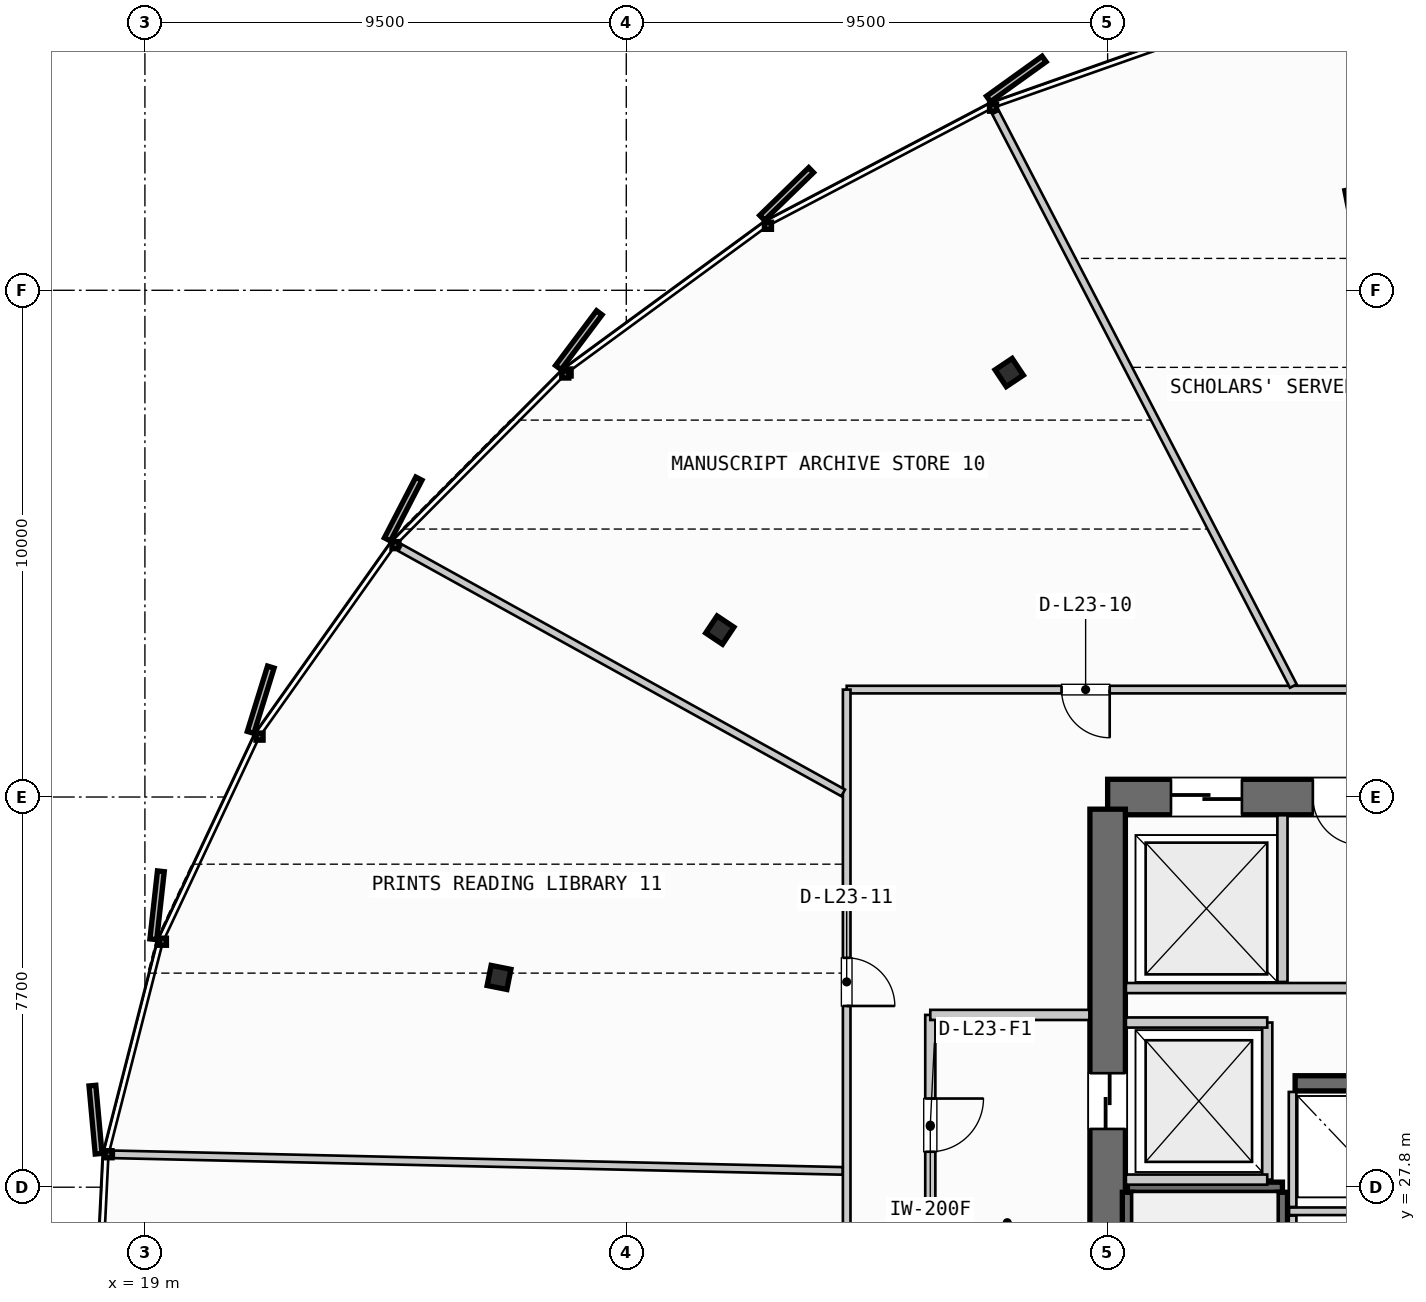
"""IFC4 building model, lengths in metres.
Left out: names, types, materials, properties, quantities, classifications, styles, units other than length and angle.
Written with IfcOpenShell. Run it as: python <this file> out.ifc"""

import sys

from ifc_helpers import new_model, si_unit, direction, frame, frame_2d, origin, origin_2d, place, context, subcontext, project, spatial, rectangle, i_section, extrude, source, transform, mapped, element, fill, save


model = new_model("IFC4")
c1 = context("Model", 3, precision=1e-05, world=origin(), true_north=direction((0.0, 1.0)))
c2 = subcontext(c1, "Body", "Model", "MODEL_VIEW")
j1 = project(units=[si_unit("LENGTHUNIT", "METRE"), si_unit("PLANEANGLEUNIT", "RADIAN")], contexts=[c1])
p1 = place(None, origin())
s1 = spatial("IfcSite", under=j1, at=p1, CompositionType="ELEMENT")
p2 = place(p1, origin())
s2 = spatial("IfcBuilding", under=s1, at=p2, CompositionType="ELEMENT")
p3 = place(p2, frame((0.0, 0.0, 96.4)))
s3 = spatial("IfcBuildingStorey", under=s2, at=p3, CompositionType="ELEMENT", Elevation=96.4)
p4 = place(p3, frame((55.6, 35.5, 0.0), z_axis=(0.0, 0.0, 1.0), x_axis=(-1.0, 0.0, 0.0)))
e1 = element("IfcWall", 1, at=p4, inside=s3, PredefinedType="SHEAR", context=c2, shape_type="SweptSolid", body=[
    extrude(rectangle(XDim=17.6, YDim=0.7, at=frame_2d((8.8, 0.0))), origin(), (0.0, 0.0, 1.0), 3.35),
])
p5 = place(p4, frame((8.05, 0.0, 0.0)))
e2 = element("IfcOpeningElement", 2, at=p5, cuts=e1, PredefinedType="OPENING", context=c2, shape_type="SweptSolid", body=[
    extrude(rectangle(XDim=1.5, YDim=2.2, at=frame_2d((0.75, 1.1))), frame((0.0, 0.36, 0.0), z_axis=(0.0, -1.0, 0.0), x_axis=(1.0, 0.0, 0.0)), (0.0, 0.0, 1.0), 0.72),
])
p6 = place(p4, frame((14.95, 0.0, 0.0)))
e3 = element("IfcOpeningElement", 3, at=p6, cuts=e1, PredefinedType="OPENING", context=c2, shape_type="SweptSolid", body=[
    extrude(rectangle(XDim=1.4, YDim=2.3, at=frame_2d((0.7, 1.15))), frame((0.0, 0.36, 0.0), z_axis=(0.0, -1.0, 0.0), x_axis=(1.0, 0.0, 0.0)), (0.0, 0.0, 1.0), 0.72),
])
p7 = place(p4, frame((12.6, 0.0, 0.0)))
e4 = element("IfcOpeningElement", 4, at=p7, cuts=e1, PredefinedType="OPENING", context=c2, shape_type="SweptSolid", body=[
    extrude(rectangle(XDim=0.95, YDim=2.15, at=frame_2d((0.475, 1.075))), frame((0.0, 0.36, 0.0), z_axis=(0.0, -1.0, 0.0), x_axis=(1.0, 0.0, 0.0)), (0.0, 0.0, 1.0), 0.72),
])
p8 = place(p4, frame((10.45, 0.0, 0.0)))
e5 = element("IfcOpeningElement", 5, at=p8, cuts=e1, PredefinedType="OPENING", context=c2, shape_type="SweptSolid", body=[
    extrude(rectangle(XDim=0.95, YDim=2.15, at=frame_2d((0.475, 1.075))), frame((0.0, 0.36, 0.0), z_axis=(0.0, -1.0, 0.0), x_axis=(1.0, 0.0, 0.0)), (0.0, 0.0, 1.0), 0.72),
])
p9 = place(p3, frame((38.0, 35.26, 0.0), z_axis=(0.0, 0.0, 1.0), x_axis=(0.0, -1.0, 0.0)))
e6 = element("IfcWall", 6, at=p9, inside=s3, PredefinedType="SHEAR", context=c2, shape_type="SweptSolid", body=[
    extrude(rectangle(XDim=14.92, YDim=0.7, at=frame_2d((7.46, 0.0))), origin(), (0.0, 0.0, 1.0), 3.35),
])
p10 = place(p9, frame((5.21, 0.0, 0.0)))
e7 = element("IfcOpeningElement", 7, at=p10, cuts=e6, PredefinedType="OPENING", context=c2, shape_type="SweptSolid", body=[
    extrude(rectangle(XDim=1.1, YDim=2.2, at=frame_2d((0.55, 1.1))), frame((0.0, 0.36, 0.0), z_axis=(0.0, -1.0, 0.0), x_axis=(1.0, 0.0, 0.0)), (0.0, 0.0, 1.0), 0.72),
])
p11 = place(p3, frame((41.7, 29.85, 0.0), z_axis=(0.0, 0.0, 1.0), x_axis=(1.0, 0.0, 0.0)))
e8 = element("IfcWall", 8, at=p11, inside=s3, PredefinedType="SHEAR", context=c2, shape_type="SweptSolid", body=[
    extrude(rectangle(XDim=4.25, YDim=0.3, at=frame_2d((2.125, 0.0))), origin(), (0.0, 0.0, 1.0), 3.35),
])
m1 = source(origin(), c2, "Body", "SweptSolid", [
    extrude(i_section(OverallWidth=0.405, OverallDepth=0.398, WebThickness=0.035, FlangeThickness=0.056, FilletRadius=0.015, at=origin_2d()), origin(), (0.0, 0.0, 1.0), 3.35),
])
for number, where, z_axis, x_axis in (
    (9, (42.919, 47.311, 0.0), (0.0, 0.0, 1.0), (-0.195, 0.981, 0.0)),
    (10, (36.058, 43.877, 0.0), (0.0, 0.0, 1.0), (-0.556, 0.831, 0.0)),
    (11, (30.346, 38.794, 0.0), (0.0, 0.0, 1.0), (-0.831, 0.556, 0.0)),
    (12, (25.989, 31.94, 0.0), (0.0, 0.0, 1.0), (-0.981, 0.195, 0.0)),
):
    element("IfcColumn", number, at=place(p3, frame(where, z_axis=z_axis, x_axis=x_axis)), inside=s3, PredefinedType="COLUMN", context=c2, shape_type="MappedRepresentation", body=[
        mapped(m1, transform((0.0, 0.0, 0.0), scale=1.0)),
    ])
p12 = place(p3, frame((38.39, 27.8, 0.0), z_axis=(0.0, 0.0, 1.0), x_axis=(1.0, 0.0, 0.0)))
e13 = element("IfcWall", 13, at=p12, inside=s3, PredefinedType="SHEAR", context=c2, shape_type="SweptSolid", body=[
    extrude(rectangle(XDim=3.06, YDim=0.2, at=frame_2d((1.53, 0.0))), origin(), (0.0, 0.0, 1.0), 3.35),
])
for number, where, z_axis, x_axis in (
    (14, (41.45, 27.7, 0.0), (0.0, 0.0, 1.0), (0.0, -1.0, 0.0)),
    (15, (38.39, 20.35, 0.0), (0.0, 0.0, 1.0), (0.0, 1.0, 0.0)),
):
    element("IfcWall", number, at=place(p3, frame(where, z_axis=z_axis, x_axis=x_axis)), inside=s3, PredefinedType="SHEAR", context=c2, shape_type="SweptSolid", body=[
        extrude(rectangle(XDim=7.35, YDim=0.2, at=frame_2d((3.675, 0.0))), origin(), (0.0, 0.0, 1.0), 3.35),
    ])
p13 = place(p3, frame((41.15, 27.95, 0.0), z_axis=(0.0, 0.0, 1.0), x_axis=(0.0, 1.0, 0.0)))
e16 = element("IfcWall", 16, at=p13, inside=s3, PredefinedType="PARTITIONING", context=c2, shape_type="SweptSolid", body=[
    extrude(rectangle(XDim=3.1, YDim=0.2, at=frame_2d((1.55, 0.0))), origin(), (0.0, 0.0, 1.0), 2.28),
])
for number, where, z_axis, x_axis in (
    (17, (38.36, 27.95, 0.0), (0.0, 0.0, 1.0), (1.0, 0.0, 0.0)),
    (18, (38.36, 31.05, 0.0), (0.0, 0.0, 1.0), (1.0, 0.0, 0.0)),
):
    element("IfcWall", number, at=place(p3, frame(where, z_axis=z_axis, x_axis=x_axis)), inside=s3, PredefinedType="PARTITIONING", context=c2, shape_type="SweptSolid", body=[
        extrude(rectangle(XDim=2.79, YDim=0.2, at=frame_2d((1.395, 0.0))), origin(), (0.0, 0.0, 1.0), 2.28),
    ])
p14 = place(p3, frame((34.5, 31.2, 0.0), z_axis=(0.0, 0.0, 1.0), x_axis=(0.0, -1.0, 0.0)))
e19 = element("IfcWall", 19, at=p14, inside=s3, PredefinedType="PARTITIONING", context=c2, shape_type="SweptSolid", body=[
    extrude(rectangle(XDim=4.4, YDim=0.2, at=frame_2d((2.2, 0.0))), origin(), (0.0, 0.0, 1.0), 2.28),
])
p15 = place(p14, frame((1.65, 0.0, 0.0)))
e20 = element("IfcOpeningElement", 20, at=p15, cuts=e19, PredefinedType="OPENING", context=c2, shape_type="SweptSolid", body=[
    extrude(rectangle(XDim=1.05, YDim=2.15, at=frame_2d((0.525, 1.075))), frame((0.0, 0.11, 0.0), z_axis=(0.0, -1.0, 0.0), x_axis=(1.0, 0.0, 0.0)), (0.0, 0.0, 1.0), 0.22),
])
p16 = place(p3, frame((34.5, 31.2, 0.0), z_axis=(0.0, 0.0, 1.0), x_axis=(1.0, 0.0, 0.0)))
e21 = element("IfcWall", 21, at=p16, inside=s3, PredefinedType="PARTITIONING", context=c2, shape_type="SweptSolid", body=[
    extrude(rectangle(XDim=3.14, YDim=0.2, at=frame_2d((1.57, 0.0))), origin(), (0.0, 0.0, 1.0), 2.28),
])
p17 = place(p3, frame((41.58, 27.325, 0.0), z_axis=(0.0, 0.0, 1.0), x_axis=(1.0, 0.0, 0.0)))
e22 = element("IfcWall", 22, at=p17, inside=s3, PredefinedType="PARTITIONING", context=c2, shape_type="SweptSolid", body=[
    extrude(rectangle(XDim=4.32, YDim=0.15, at=frame_2d((2.16, 0.0))), origin(), (0.0, 0.0, 1.0), 2.28),
])
p18 = place(p3, frame((41.65, 24.92, 0.0), z_axis=(0.0, 0.0, 1.0), x_axis=(0.0, 1.0, 0.0)))
e23 = element("IfcWall", 23, at=p18, inside=s3, PredefinedType="PARTITIONING", context=c2, shape_type="SweptSolid", body=[
    extrude(rectangle(XDim=2.32, YDim=0.15, at=frame_2d((1.16, 0.0))), origin(), (0.0, 0.0, 1.0), 2.28),
])
p19 = place(p3, frame((41.65, 27.41, 0.0), z_axis=(0.0, 0.0, 1.0), x_axis=(0.0, 1.0, 0.0)))
e24 = element("IfcWall", 24, at=p19, inside=s3, PredefinedType="PARTITIONING", context=c2, shape_type="SweptSolid", body=[
    extrude(rectangle(XDim=2.27, YDim=0.15, at=frame_2d((1.135, 0.0))), origin(), (0.0, 0.0, 1.0), 2.28),
])
p20 = place(p3, frame((41.45, 31.85, 0.0), z_axis=(0.0, 0.0, 1.0), x_axis=(0.0, 1.0, 0.0)))
e25 = element("IfcWall", 25, at=p20, inside=s3, PredefinedType="PARTITIONING", context=c2, shape_type="SweptSolid", body=[
    extrude(rectangle(XDim=3.29, YDim=0.2, at=frame_2d((1.645, 0.0))), origin(), (0.0, 0.0, 1.0), 2.28),
])
p21 = place(p3, frame((38.36, 31.73, 0.0), z_axis=(0.0, 0.0, 1.0), x_axis=(1.0, 0.0, 0.0)))
e26 = element("IfcWall", 26, at=p21, inside=s3, PredefinedType="PARTITIONING", context=c2, shape_type="SweptSolid", body=[
    extrude(rectangle(XDim=7.44, YDim=0.2, at=frame_2d((3.72, 0.0))), origin(), (0.0, 0.0, 1.0), 2.28),
])
p22 = place(p3, frame((61.27, 37.62, 0.0), z_axis=(0.0, 0.0, 1.0), x_axis=(-1.0, 0.0, 0.0)))
e27 = element("IfcWall", 27, at=p22, inside=s3, PredefinedType="PARTITIONING", context=c2, shape_type="SweptSolid", body=[
    extrude(rectangle(XDim=28.42, YDim=0.15, at=frame_2d((14.21, 0.0))), origin(), (0.0, 0.0, 1.0), 2.28),
])
p23 = place(p22, frame((2.656, 0.0, 0.0)))
e28 = element("IfcOpeningElement", 28, at=p23, cuts=e27, PredefinedType="OPENING", context=c2, shape_type="SweptSolid", body=[
    extrude(rectangle(XDim=0.95, YDim=2.15, at=frame_2d((0.475, 1.075))), frame((0.0, 0.085, 0.0), z_axis=(0.0, -1.0, 0.0), x_axis=(1.0, 0.0, 0.0)), (0.0, 0.0, 1.0), 0.17),
])
p24 = place(p22, frame((9.818, 0.0, 0.0)))
e29 = element("IfcOpeningElement", 29, at=p24, cuts=e27, PredefinedType="OPENING", context=c2, shape_type="SweptSolid", body=[
    extrude(rectangle(XDim=0.95, YDim=2.15, at=frame_2d((0.475, 1.075))), frame((0.0, 0.085, 0.0), z_axis=(0.0, -1.0, 0.0), x_axis=(1.0, 0.0, 0.0)), (0.0, 0.0, 1.0), 0.17),
])
p25 = place(p22, frame((16.826, 0.0, 0.0)))
e30 = element("IfcOpeningElement", 30, at=p25, cuts=e27, PredefinedType="OPENING", context=c2, shape_type="SweptSolid", body=[
    extrude(rectangle(XDim=0.95, YDim=2.15, at=frame_2d((0.475, 1.075))), frame((0.0, 0.085, 0.0), z_axis=(0.0, -1.0, 0.0), x_axis=(1.0, 0.0, 0.0)), (0.0, 0.0, 1.0), 0.17),
])
p26 = place(p22, frame((23.229, 0.0, 0.0)))
e31 = element("IfcOpeningElement", 31, at=p26, cuts=e27, PredefinedType="OPENING", context=c2, shape_type="SweptSolid", body=[
    extrude(rectangle(XDim=0.95, YDim=2.15, at=frame_2d((0.475, 1.075))), frame((0.0, 0.085, 0.0), z_axis=(0.0, -1.0, 0.0), x_axis=(1.0, 0.0, 0.0)), (0.0, 0.0, 1.0), 0.17),
])
p27 = place(p3, frame((32.85, 37.62, 0.0), z_axis=(0.0, 0.0, 1.0), x_axis=(0.0, -1.0, 0.0)))
e32 = element("IfcWall", 32, at=p27, inside=s3, PredefinedType="PARTITIONING", context=c2, shape_type="SweptSolid", body=[
    extrude(rectangle(XDim=20.48, YDim=0.15, at=frame_2d((10.24, 0.0))), origin(), (0.0, 0.0, 1.0), 2.28),
])
p28 = place(p27, frame((5.293, 0.0, 0.0)))
e33 = element("IfcOpeningElement", 33, at=p28, cuts=e32, PredefinedType="OPENING", context=c2, shape_type="SweptSolid", body=[
    extrude(rectangle(XDim=0.95, YDim=2.15, at=frame_2d((0.475, 1.075))), frame((0.0, 0.085, 0.0), z_axis=(0.0, -1.0, 0.0), x_axis=(1.0, 0.0, 0.0)), (0.0, 0.0, 1.0), 0.17),
])
p29 = place(p27, frame((14.225, 0.0, 0.0)))
e34 = element("IfcOpeningElement", 34, at=p29, cuts=e32, PredefinedType="OPENING", context=c2, shape_type="SweptSolid", body=[
    extrude(rectangle(XDim=0.95, YDim=2.15, at=frame_2d((0.475, 1.075))), frame((0.0, 0.085, 0.0), z_axis=(0.0, -1.0, 0.0), x_axis=(1.0, 0.0, 0.0)), (0.0, 0.0, 1.0), 0.17),
])
p30 = place(p3, frame((41.665, 37.691, 0.0), z_axis=(0.0, 0.0, 1.0), x_axis=(-0.46076800873, 0.887520615046, 0.0)))
e35 = element("IfcWall", 35, at=p30, inside=s3, PredefinedType="PARTITIONING", context=c2, shape_type="SweptSolid", body=[
    extrude(rectangle(XDim=12.754, YDim=0.15, at=frame_2d((6.377, 0.0))), origin(), (0.0, 0.0, 1.0), 2.28),
])
p31 = place(p3, frame((32.78, 35.582, 0.0), z_axis=(0.0, 0.0, 1.0), x_axis=(-0.87494903395, 0.484215022475, 0.0)))
e36 = element("IfcWall", 36, at=p31, inside=s3, PredefinedType="PARTITIONING", context=c2, shape_type="SweptSolid", body=[
    extrude(rectangle(XDim=9.992, YDim=0.15, at=frame_2d((4.996, 0.0))), origin(), (0.0, 0.0, 1.0), 2.28),
])
p32 = place(p3, frame((32.77, 28.122, 0.0), z_axis=(0.0, 0.0, 1.0), x_axis=(-0.999741844305, 0.022721019901, 0.0)))
e37 = element("IfcWall", 37, at=p32, inside=s3, PredefinedType="PARTITIONING", context=c2, shape_type="SweptSolid", body=[
    extrude(rectangle(XDim=14.388, YDim=0.15, at=frame_2d((7.194, 0.0))), origin(), (0.0, 0.0, 1.0), 2.28),
])
m2 = source(origin(), c2, "Body", "SweptSolid", [
    extrude(rectangle(XDim=1.1, YDim=2.2, at=frame_2d((0.55, 1.1))), frame((0.0, 0.025, 0.0), z_axis=(0.0, -1.0, 0.0), x_axis=(1.0, 0.0, 0.0)), (0.0, 0.0, 1.0), 0.05),
])
p33 = place(p10, origin())
e38 = element("IfcDoor", 38, at=p33, inside=s3, OperationType="SLIDING_TO_LEFT", PredefinedType="DOOR", context=c2, shape_type="MappedRepresentation", body=[
    mapped(m2, transform((0.0, 0.0, 0.0), scale=1.0)),
])
fill(e7, e38)
m3 = source(origin(), c2, "Body", "SweptSolid", [
    extrude(rectangle(XDim=1.4, YDim=2.3, at=frame_2d((0.7, 1.15))), frame((0.0, 0.025, 0.0), z_axis=(0.0, -1.0, 0.0), x_axis=(1.0, 0.0, 0.0)), (0.0, 0.0, 1.0), 0.05),
])
p34 = place(p6, origin())
e39 = element("IfcDoor", 39, at=p34, inside=s3, OperationType="SLIDING_TO_RIGHT", PredefinedType="DOOR", context=c2, shape_type="MappedRepresentation", body=[
    mapped(m3, transform((0.0, 0.0, 0.0), scale=1.0)),
])
fill(e3, e39)
m4 = source(origin(), c2, "Body", "SweptSolid", [
    extrude(rectangle(XDim=0.95, YDim=2.15, at=frame_2d((0.475, 1.075))), frame((0.0, 0.025, 0.0), z_axis=(0.0, -1.0, 0.0), x_axis=(1.0, 0.0, 0.0)), (0.0, 0.0, 1.0), 0.05),
])
p35 = place(p7, origin())
e40 = element("IfcDoor", 40, at=p35, inside=s3, OperationType="SINGLE_SWING_LEFT", PredefinedType="DOOR", context=c2, shape_type="MappedRepresentation", body=[
    mapped(m4, transform((0.0, 0.0, 0.0), scale=1.0)),
])
fill(e4, e40)
m5 = source(origin(), c2, "Body", "SweptSolid", [
    extrude(rectangle(XDim=1.05, YDim=2.15, at=frame_2d((0.525, 1.075))), frame((0.0, 0.025, 0.0), z_axis=(0.0, -1.0, 0.0), x_axis=(1.0, 0.0, 0.0)), (0.0, 0.0, 1.0), 0.05),
])
p36 = place(p15, origin())
e41 = element("IfcDoor", 41, at=p36, inside=s3, OperationType="SINGLE_SWING_LEFT", PredefinedType="DOOR", context=c2, shape_type="MappedRepresentation", body=[
    mapped(m5, transform((0.0, 0.0, 0.0), scale=1.0)),
])
fill(e20, e41)
p37 = place(p26, origin())
e42 = element("IfcDoor", 42, at=p37, inside=s3, OperationType="SINGLE_SWING_LEFT", PredefinedType="DOOR", context=c2, shape_type="MappedRepresentation", body=[
    mapped(m4, transform((0.0, 0.0, 0.0), scale=1.0)),
])
fill(e31, e42)
p38 = place(p28, origin())
e43 = element("IfcDoor", 43, at=p38, inside=s3, OperationType="SINGLE_SWING_RIGHT", PredefinedType="DOOR", context=c2, shape_type="MappedRepresentation", body=[
    mapped(m4, transform((0.0, 0.0, 0.0), scale=1.0)),
])
fill(e33, e43)
save(model, sys.argv[1])
